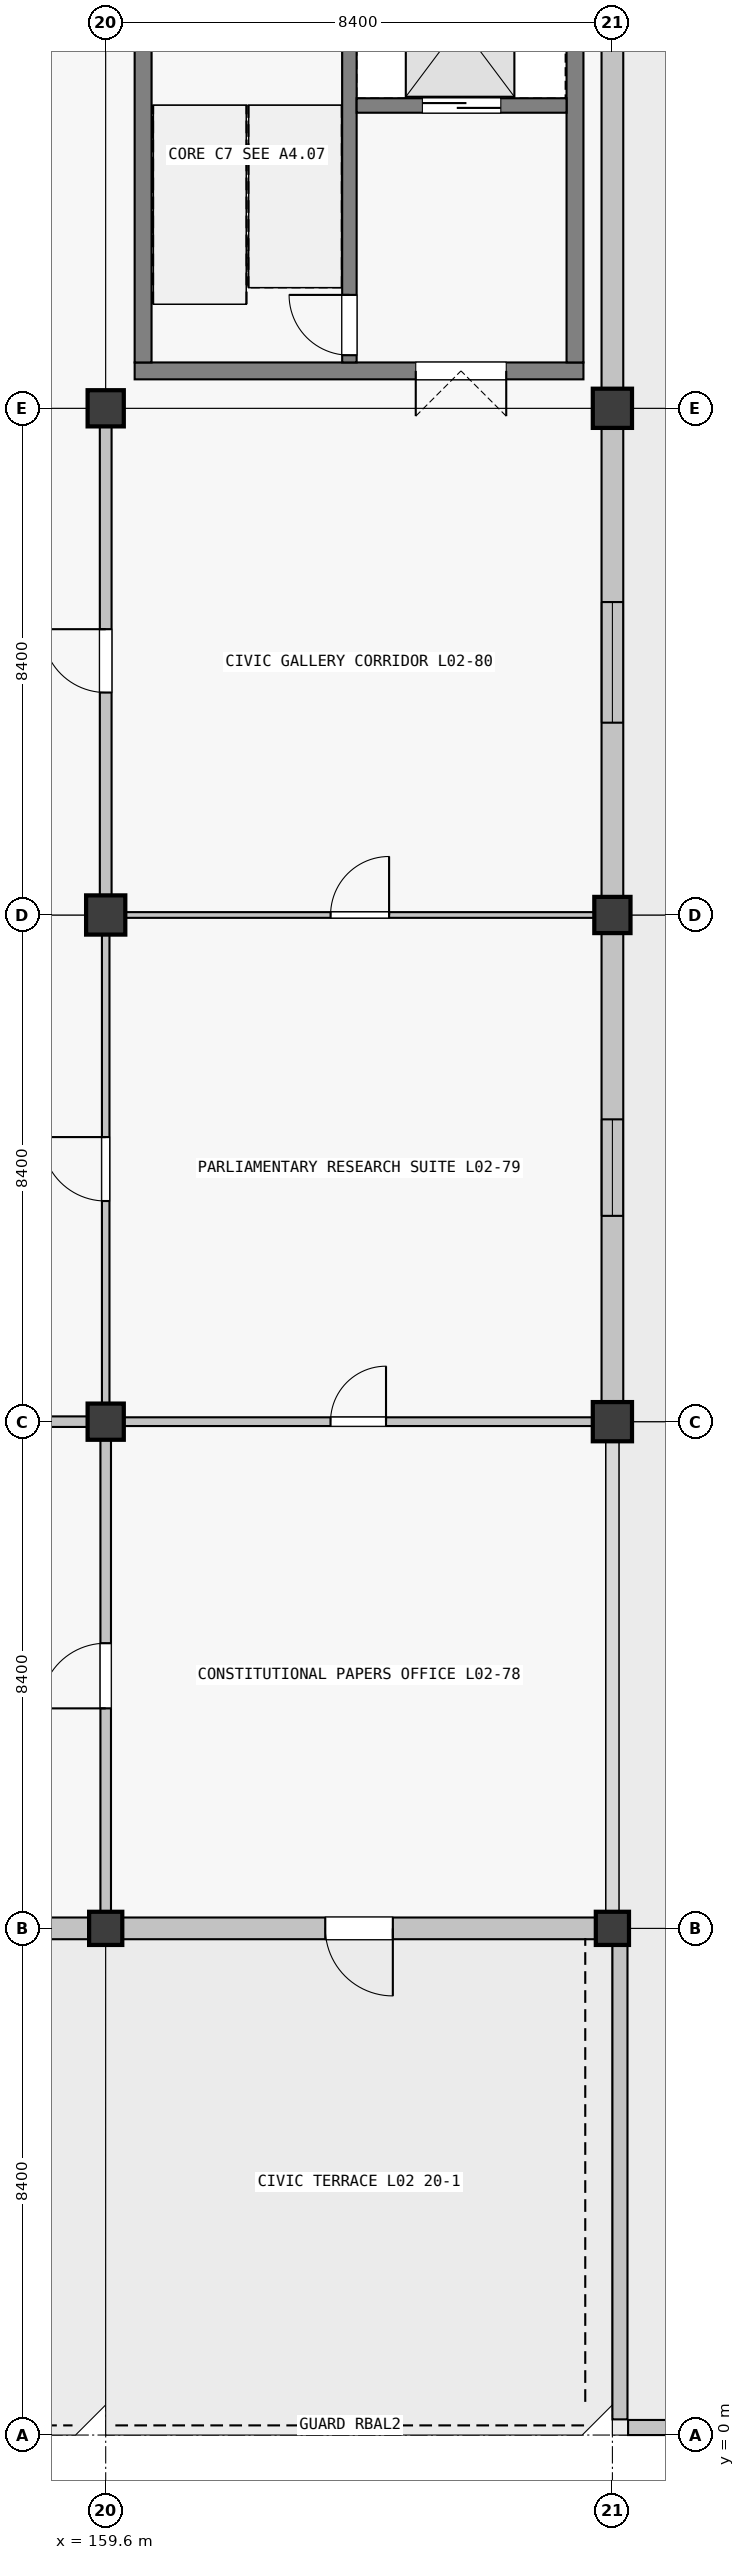
"""IFC4 building model, lengths in metres.
Left out: names, types, materials, properties, quantities, classifications, styles, units other than length and angle.
Written with IfcOpenShell. Run it as: python <this file> out.ifc"""

import sys

from ifc_helpers import new_model, si_unit, direction, frame, frame_2d, origin, origin_2d, place, context, subcontext, project, spatial, rectangle, extrude, element, fill, save


model = new_model("IFC4")
c1 = context("Model", 3, precision=1e-05, world=origin(), true_north=direction((0.0, 1.0)))
c2 = subcontext(c1, "Body", "Model", "MODEL_VIEW")
j1 = project(units=[si_unit("LENGTHUNIT", "METRE"), si_unit("PLANEANGLEUNIT", "RADIAN")], contexts=[c1])
p1 = place(None, origin())
s1 = spatial("IfcSite", under=j1, at=p1, CompositionType="ELEMENT")
p2 = place(p1, origin())
s2 = spatial("IfcBuilding", under=s1, at=p2, CompositionType="ELEMENT")
p3 = place(p2, frame((0.0, 0.0, 10.26)))
s3 = spatial("IfcBuildingStorey", under=s2, at=p3, CompositionType="ELEMENT", Elevation=10.26)
p4 = place(p3, frame((159.6, 8.4, 0.0), z_axis=(0.0, 0.0, 1.0), x_axis=(1.0, 0.0, 0.0)))
e1 = element("IfcColumn", 1, at=p4, inside=s3, PredefinedType="COLUMN", context=c2, shape_type="SweptSolid", body=[
    extrude(rectangle(XDim=0.55, YDim=0.55, at=origin_2d()), origin(), (0.0, 0.0, 1.0), 4.25),
])
p5 = place(p3, frame((159.6, 16.8, 0.0), z_axis=(0.0, 0.0, 1.0), x_axis=(1.0, 0.0, 0.0)))
e2 = element("IfcColumn", 2, at=p5, inside=s3, PredefinedType="COLUMN", context=c2, shape_type="SweptSolid", body=[
    extrude(rectangle(XDim=0.6, YDim=0.6, at=origin_2d()), origin(), (0.0, 0.0, 1.0), 4.5),
])
p6 = place(p3, frame((159.6, 25.2, 0.0), z_axis=(0.0, 0.0, 1.0), x_axis=(1.0, 0.0, 0.0)))
e3 = element("IfcColumn", 3, at=p6, inside=s3, PredefinedType="COLUMN", context=c2, shape_type="SweptSolid", body=[
    extrude(rectangle(XDim=0.65, YDim=0.65, at=origin_2d()), origin(), (0.0, 0.0, 1.0), 4.5),
])
p7 = place(p3, frame((159.6, 33.6, 0.0), z_axis=(0.0, 0.0, 1.0), x_axis=(1.0, 0.0, 0.0)))
e4 = element("IfcColumn", 4, at=p7, inside=s3, PredefinedType="COLUMN", context=c2, shape_type="SweptSolid", body=[
    extrude(rectangle(XDim=0.6, YDim=0.6, at=origin_2d()), origin(), (0.0, 0.0, 1.0), 4.5),
])
p8 = place(p3, frame((168.0, 8.4, 0.0), z_axis=(0.0, 0.0, 1.0), x_axis=(1.0, 0.0, 0.0)))
e5 = element("IfcColumn", 5, at=p8, inside=s3, PredefinedType="COLUMN", context=c2, shape_type="SweptSolid", body=[
    extrude(rectangle(XDim=0.55, YDim=0.55, at=origin_2d()), origin(), (0.0, 0.0, 1.0), 4.25),
])
p9 = place(p3, frame((168.0, 16.8, 0.0), z_axis=(0.0, 0.0, 1.0), x_axis=(1.0, 0.0, 0.0)))
e6 = element("IfcColumn", 6, at=p9, inside=s3, PredefinedType="COLUMN", context=c2, shape_type="SweptSolid", body=[
    extrude(rectangle(XDim=0.65, YDim=0.65, at=origin_2d()), origin(), (0.0, 0.0, 1.0), 4.5),
])
p10 = place(p3, frame((168.0, 25.2, 0.0), z_axis=(0.0, 0.0, 1.0), x_axis=(1.0, 0.0, 0.0)))
e7 = element("IfcColumn", 7, at=p10, inside=s3, PredefinedType="COLUMN", context=c2, shape_type="SweptSolid", body=[
    extrude(rectangle(XDim=0.6, YDim=0.6, at=origin_2d()), origin(), (0.0, 0.0, 1.0), 4.5),
])
p11 = place(p3, frame((168.0, 33.6, 0.0), z_axis=(0.0, 0.0, 1.0), x_axis=(1.0, 0.0, 0.0)))
e8 = element("IfcColumn", 8, at=p11, inside=s3, PredefinedType="COLUMN", context=c2, shape_type="SweptSolid", body=[
    extrude(rectangle(XDim=0.65, YDim=0.65, at=origin_2d()), origin(), (0.0, 0.0, 1.0), 4.5),
])
p12 = place(p3, frame((159.324, 8.4, 0.0), z_axis=(0.0, 0.0, 1.0), x_axis=(-1.0, 0.0, 0.0)))
e9 = element("IfcWall", 9, at=p12, inside=s3, PredefinedType="SOLIDWALL", context=c2, shape_type="SweptSolid", body=[
    extrude(rectangle(XDim=7.848, YDim=0.36, at=frame_2d((3.924, 0.0))), origin(), (0.0, 0.0, 1.0), 3.54),
])
p13 = place(p12, frame((2.999, 0.0, 0.0)))
e10 = element("IfcOpeningElement", 10, at=p13, cuts=e9, PredefinedType="OPENING", context=c2, shape_type="SweptSolid", body=[
    extrude(rectangle(XDim=1.85, YDim=2.2, at=frame_2d((0.925, 1.1))), frame((0.0, 0.18, 0.0), z_axis=(0.0, -1.0, 0.0), x_axis=(1.0, 0.0, 0.0)), (0.0, 0.0, 1.0), 0.36),
])
p14 = place(p3, frame((167.724, 8.4, 0.0), z_axis=(0.0, 0.0, 1.0), x_axis=(-1.0, 0.0, 0.0)))
e11 = element("IfcWall", 11, at=p14, inside=s3, PredefinedType="SOLIDWALL", context=c2, shape_type="SweptSolid", body=[
    extrude(rectangle(XDim=7.848, YDim=0.36, at=frame_2d((3.924, 0.0))), origin(), (0.0, 0.0, 1.0), 3.54),
])
p15 = place(p14, frame((3.364, 0.0, 0.0)))
e12 = element("IfcOpeningElement", 12, at=p15, cuts=e11, PredefinedType="OPENING", context=c2, shape_type="SweptSolid", body=[
    extrude(rectangle(XDim=1.12, YDim=2.2, at=frame_2d((0.56, 1.1))), frame((0.0, 0.18, 0.0), z_axis=(0.0, -1.0, 0.0), x_axis=(1.0, 0.0, 0.0)), (0.0, 0.0, 1.0), 0.36),
])
p16 = place(p3, frame((168.0, 24.899, 0.0), z_axis=(0.0, 0.0, 1.0), x_axis=(0.0, -1.0, 0.0)))
e13 = element("IfcWall", 13, at=p16, inside=s3, PredefinedType="SOLIDWALL", context=c2, shape_type="SweptSolid", body=[
    extrude(rectangle(XDim=7.773, YDim=0.36, at=frame_2d((3.886, 0.0))), origin(), (0.0, 0.0, 1.0), 3.54),
])
p17 = place(p16, frame((3.087, 0.0, 0.9)))
e14 = element("IfcOpeningElement", 14, at=p17, cuts=e13, PredefinedType="OPENING", context=c2, shape_type="SweptSolid", body=[
    extrude(rectangle(XDim=1.6, YDim=2.1, at=frame_2d((0.8, 1.05))), frame((0.0, 0.18, 0.0), z_axis=(0.0, -1.0, 0.0), x_axis=(1.0, 0.0, 0.0)), (0.0, 0.0, 1.0), 0.36),
])
p18 = place(p3, frame((168.0, 33.274, 0.0), z_axis=(0.0, 0.0, 1.0), x_axis=(0.0, -1.0, 0.0)))
e15 = element("IfcWall", 15, at=p18, inside=s3, PredefinedType="SOLIDWALL", context=c2, shape_type="SweptSolid", body=[
    extrude(rectangle(XDim=7.773, YDim=0.36, at=frame_2d((3.886, 0.0))), origin(), (0.0, 0.0, 1.0), 3.54),
])
p19 = place(p18, frame((2.886, 0.0, 0.9)))
e16 = element("IfcOpeningElement", 16, at=p19, cuts=e15, PredefinedType="OPENING", context=c2, shape_type="SweptSolid", body=[
    extrude(rectangle(XDim=2.0, YDim=2.1, at=frame_2d((1.0, 1.05))), frame((0.0, 0.18, 0.0), z_axis=(0.0, -1.0, 0.0), x_axis=(1.0, 0.0, 0.0)), (0.0, 0.0, 1.0), 0.36),
])
p20 = place(p3, frame((168.0, 41.699, 0.0), z_axis=(0.0, 0.0, 1.0), x_axis=(0.0, -1.0, 0.0)))
e17 = element("IfcWall", 17, at=p20, inside=s3, PredefinedType="SOLIDWALL", context=c2, shape_type="SweptSolid", body=[
    extrude(rectangle(XDim=7.773, YDim=0.36, at=frame_2d((3.886, 0.0))), origin(), (0.0, 0.0, 1.0), 3.54),
])
for number, where, z_axis, x_axis in (
    (18, (176.14, 0.125, 0.0), (0.0, 0.0, 1.0), (-1.0, 0.0, 0.0)),
    (19, (168.125, 0.26, 0.0), (0.0, 0.0, 1.0), (0.0, 1.0, 0.0)),
):
    element("IfcWall", number, at=place(p3, frame(where, z_axis=z_axis, x_axis=x_axis)), inside=s3, PredefinedType="PARAPET", context=c2, shape_type="SweptSolid", body=[
        extrude(rectangle(XDim=7.88, YDim=0.25, at=frame_2d((3.94, 0.0))), origin(), (0.0, 0.0, 1.0), 0.95),
    ])
p21 = place(p3, frame((167.52, 34.22, 0.0), z_axis=(0.0, 0.0, 1.0), x_axis=(-1.0, 0.0, 0.0)))
e20 = element("IfcWall", 20, at=p21, inside=s3, PredefinedType="SHEAR", context=c2, shape_type="SweptSolid", body=[
    extrude(rectangle(XDim=7.44, YDim=0.28, at=frame_2d((3.72, 0.0))), origin(), (0.0, 0.0, 1.0), 4.5),
])
p22 = place(p21, frame((1.28, 0.0, 0.0)))
e21 = element("IfcOpeningElement", 21, at=p22, cuts=e20, PredefinedType="OPENING", context=c2, shape_type="SweptSolid", body=[
    extrude(rectangle(XDim=1.5, YDim=2.15, at=frame_2d((0.75, 1.075))), frame((0.0, 0.14, 0.0), z_axis=(0.0, -1.0, 0.0), x_axis=(1.0, 0.0, 0.0)), (0.0, 0.0, 1.0), 0.28),
])
for number, where, z_axis, x_axis in (
    (22, (160.22, 34.36, 0.0), (0.0, 0.0, 1.0), (0.0, 1.0, 0.0)),
    (23, (167.38, 41.24, 0.0), (0.0, 0.0, 1.0), (0.0, -1.0, 0.0)),
):
    element("IfcWall", number, at=place(p3, frame(where, z_axis=z_axis, x_axis=x_axis)), inside=s3, PredefinedType="SHEAR", context=c2, shape_type="SweptSolid", body=[
        extrude(rectangle(XDim=6.88, YDim=0.28, at=frame_2d((3.44, 0.0))), origin(), (0.0, 0.0, 1.0), 4.5),
    ])
p23 = place(p3, frame((163.64, 34.36, 0.0), z_axis=(0.0, 0.0, 1.0), x_axis=(0.0, 1.0, 0.0)))
e24 = element("IfcWall", 24, at=p23, inside=s3, PredefinedType="SHEAR", context=c2, shape_type="SweptSolid", body=[
    extrude(rectangle(XDim=6.88, YDim=0.24, at=frame_2d((3.44, 0.0))), origin(), (0.0, 0.0, 1.0), 4.5),
])
p24 = place(p23, frame((0.12, 0.0, 0.0)))
e25 = element("IfcOpeningElement", 25, at=p24, cuts=e24, PredefinedType="OPENING", context=c2, shape_type="SweptSolid", body=[
    extrude(rectangle(XDim=1.0, YDim=2.15, at=frame_2d((0.5, 1.075))), frame((0.0, 0.12, 0.0), z_axis=(0.0, -1.0, 0.0), x_axis=(1.0, 0.0, 0.0)), (0.0, 0.0, 1.0), 0.24),
])
p25 = place(p3, frame((163.76, 38.62, 0.0), z_axis=(0.0, 0.0, 1.0), x_axis=(1.0, 0.0, 0.0)))
e26 = element("IfcWall", 26, at=p25, inside=s3, PredefinedType="SHEAR", context=c2, shape_type="SweptSolid", body=[
    extrude(rectangle(XDim=3.48, YDim=0.24, at=frame_2d((1.74, 0.0))), origin(), (0.0, 0.0, 1.0), 4.5),
])
p26 = place(p25, frame((1.09, 0.0, 0.0)))
e27 = element("IfcOpeningElement", 27, at=p26, cuts=e26, PredefinedType="OPENING", context=c2, shape_type="SweptSolid", body=[
    extrude(rectangle(XDim=1.3, YDim=2.25, at=frame_2d((0.65, 1.125))), frame((0.0, 0.12, 0.0), z_axis=(0.0, -1.0, 0.0), x_axis=(1.0, 0.0, 0.0)), (0.0, 0.0, 1.0), 0.24),
])
p27 = place(p3, frame((151.527, 16.8, 0.0), z_axis=(0.0, 0.0, 1.0), x_axis=(1.0, 0.0, 0.0)))
e28 = element("IfcWall", 28, at=p27, inside=s3, PredefinedType="PARTITIONING", context=c2, shape_type="SweptSolid", body=[
    extrude(rectangle(XDim=7.771, YDim=0.175, at=frame_2d((3.885, 0.0))), origin(), (0.0, 0.0, 1.0), 3.37),
])
p28 = place(p27, frame((3.396, 0.0, 0.0)))
e29 = element("IfcOpeningElement", 29, at=p28, cuts=e28, PredefinedType="OPENING", context=c2, shape_type="SweptSolid", body=[
    extrude(rectangle(XDim=0.98, YDim=2.18, at=frame_2d((0.49, 1.09))), frame((0.0, 0.087, 0.0), z_axis=(0.0, -1.0, 0.0), x_axis=(1.0, 0.0, 0.0)), (0.0, 0.0, 1.0), 0.175),
])
p29 = place(p3, frame((159.902, 16.8, 0.0), z_axis=(0.0, 0.0, 1.0), x_axis=(1.0, 0.0, 0.0)))
e30 = element("IfcWall", 30, at=p29, inside=s3, PredefinedType="PARTITIONING", context=c2, shape_type="SweptSolid", body=[
    extrude(rectangle(XDim=7.771, YDim=0.145, at=frame_2d((3.885, 0.0))), origin(), (0.0, 0.0, 1.0), 3.37),
])
p30 = place(p29, frame((3.425, 0.0, 0.0)))
e31 = element("IfcOpeningElement", 31, at=p30, cuts=e30, PredefinedType="OPENING", context=c2, shape_type="SweptSolid", body=[
    extrude(rectangle(XDim=0.92, YDim=2.15, at=frame_2d((0.46, 1.075))), frame((0.0, 0.073, 0.0), z_axis=(0.0, -1.0, 0.0), x_axis=(1.0, 0.0, 0.0)), (0.0, 0.0, 1.0), 0.145),
])
p31 = place(p3, frame((159.927, 25.2, 0.0), z_axis=(0.0, 0.0, 1.0), x_axis=(1.0, 0.0, 0.0)))
e32 = element("IfcWall", 32, at=p31, inside=s3, PredefinedType="PARTITIONING", context=c2, shape_type="SweptSolid", body=[
    extrude(rectangle(XDim=7.771, YDim=0.095, at=frame_2d((3.885, 0.0))), origin(), (0.0, 0.0, 1.0), 3.37),
])
p32 = place(p31, frame((3.401, 0.0, 0.0)))
e33 = element("IfcOpeningElement", 33, at=p32, cuts=e32, PredefinedType="OPENING", context=c2, shape_type="SweptSolid", body=[
    extrude(rectangle(XDim=0.97, YDim=2.12, at=frame_2d((0.485, 1.06))), frame((0.0, 0.047, 0.0), z_axis=(0.0, -1.0, 0.0), x_axis=(1.0, 0.0, 0.0)), (0.0, 0.0, 1.0), 0.095),
])
p33 = place(p3, frame((159.6, 8.677, 0.0), z_axis=(0.0, 0.0, 1.0), x_axis=(0.0, 1.0, 0.0)))
e34 = element("IfcWall", 34, at=p33, inside=s3, PredefinedType="PARTITIONING", context=c2, shape_type="SweptSolid", body=[
    extrude(rectangle(XDim=7.821, YDim=0.175, at=frame_2d((3.911, 0.0))), origin(), (0.0, 0.0, 1.0), 3.37),
])
p34 = place(p33, frame((3.37, 0.0, 0.0)))
e35 = element("IfcOpeningElement", 35, at=p34, cuts=e34, PredefinedType="OPENING", context=c2, shape_type="SweptSolid", body=[
    extrude(rectangle(XDim=1.08, YDim=2.25, at=frame_2d((0.54, 1.125))), frame((0.0, 0.087, 0.0), z_axis=(0.0, -1.0, 0.0), x_axis=(1.0, 0.0, 0.0)), (0.0, 0.0, 1.0), 0.175),
])
p35 = place(p3, frame((159.6, 17.102, 0.0), z_axis=(0.0, 0.0, 1.0), x_axis=(0.0, 1.0, 0.0)))
e36 = element("IfcWall", 36, at=p35, inside=s3, PredefinedType="PARTITIONING", context=c2, shape_type="SweptSolid", body=[
    extrude(rectangle(XDim=7.771, YDim=0.125, at=frame_2d((3.885, 0.0))), origin(), (0.0, 0.0, 1.0), 3.37),
])
p36 = place(p35, frame((3.356, 0.0, 0.0)))
e37 = element("IfcOpeningElement", 37, at=p36, cuts=e36, PredefinedType="OPENING", context=c2, shape_type="SweptSolid", body=[
    extrude(rectangle(XDim=1.06, YDim=2.25, at=frame_2d((0.53, 1.125))), frame((0.0, 0.062, 0.0), z_axis=(0.0, -1.0, 0.0), x_axis=(1.0, 0.0, 0.0)), (0.0, 0.0, 1.0), 0.125),
])
p37 = place(p3, frame((159.6, 25.527, 0.0), z_axis=(0.0, 0.0, 1.0), x_axis=(0.0, 1.0, 0.0)))
e38 = element("IfcWall", 38, at=p37, inside=s3, PredefinedType="PARTITIONING", context=c2, shape_type="SweptSolid", body=[
    extrude(rectangle(XDim=7.771, YDim=0.195, at=frame_2d((3.885, 0.0))), origin(), (0.0, 0.0, 1.0), 3.37),
])
p38 = place(p37, frame((3.361, 0.0, 0.0)))
e39 = element("IfcOpeningElement", 39, at=p38, cuts=e38, PredefinedType="OPENING", context=c2, shape_type="SweptSolid", body=[
    extrude(rectangle(XDim=1.05, YDim=2.12, at=frame_2d((0.525, 1.06))), frame((0.0, 0.098, 0.0), z_axis=(0.0, -1.0, 0.0), x_axis=(1.0, 0.0, 0.0)), (0.0, 0.0, 1.0), 0.195),
])
p39 = place(p15, origin())
e40 = element("IfcDoor", 40, at=p39, inside=s3, OperationType="SINGLE_SWING_LEFT", PredefinedType="DOOR", context=c2, shape_type="SweptSolid", body=[
    extrude(rectangle(XDim=1.12, YDim=2.2, at=frame_2d((0.56, 1.1))), frame((0.0, 0.025, 0.0), z_axis=(0.0, -1.0, 0.0), x_axis=(1.0, 0.0, 0.0)), (0.0, 0.0, 1.0), 0.05),
])
fill(e12, e40)
p40 = place(p17, origin())
e41 = element("IfcWindow", 41, at=p40, inside=s3, PartitioningType="SINGLE_PANEL", PredefinedType="WINDOW", context=c2, shape_type="SweptSolid", body=[
    extrude(rectangle(XDim=1.6, YDim=2.1, at=frame_2d((0.8, 1.05))), frame((0.0, 0.03, 0.0), z_axis=(0.0, -1.0, 0.0), x_axis=(1.0, 0.0, 0.0)), (0.0, 0.0, 1.0), 0.06),
])
fill(e14, e41)
p41 = place(p19, origin())
e42 = element("IfcWindow", 42, at=p41, inside=s3, PartitioningType="SINGLE_PANEL", PredefinedType="WINDOW", context=c2, shape_type="SweptSolid", body=[
    extrude(rectangle(XDim=2.0, YDim=2.1, at=frame_2d((1.0, 1.05))), frame((0.0, 0.03, 0.0), z_axis=(0.0, -1.0, 0.0), x_axis=(1.0, 0.0, 0.0)), (0.0, 0.0, 1.0), 0.06),
])
fill(e16, e42)
p42 = place(p24, origin())
e43 = element("IfcDoor", 43, at=p42, inside=s3, OperationType="SINGLE_SWING_RIGHT", PredefinedType="DOOR", context=c2, shape_type="SweptSolid", body=[
    extrude(rectangle(XDim=1.0, YDim=2.15, at=frame_2d((0.5, 1.075))), frame((0.0, 0.025, 0.0), z_axis=(0.0, -1.0, 0.0), x_axis=(1.0, 0.0, 0.0)), (0.0, 0.0, 1.0), 0.05),
])
fill(e25, e43)
p43 = place(p22, origin())
e44 = element("IfcDoor", 44, at=p43, inside=s3, OperationType="DOUBLE_DOOR_SINGLE_SWING", PredefinedType="DOOR", context=c2, shape_type="SweptSolid", body=[
    extrude(rectangle(XDim=1.5, YDim=2.15, at=frame_2d((0.75, 1.075))), frame((0.0, 0.025, 0.0), z_axis=(0.0, -1.0, 0.0), x_axis=(1.0, 0.0, 0.0)), (0.0, 0.0, 1.0), 0.05),
])
fill(e21, e44)
p44 = place(p26, origin())
e45 = element("IfcDoor", 45, at=p44, inside=s3, OperationType="DOUBLE_DOOR_SLIDING", PredefinedType="DOOR", context=c2, shape_type="SweptSolid", body=[
    extrude(rectangle(XDim=1.3, YDim=2.25, at=frame_2d((0.65, 1.125))), frame((0.0, 0.025, 0.0), z_axis=(0.0, -1.0, 0.0), x_axis=(1.0, 0.0, 0.0)), (0.0, 0.0, 1.0), 0.05),
])
fill(e27, e45)
p45 = place(p32, origin())
e46 = element("IfcDoor", 46, at=p45, inside=s3, OperationType="SINGLE_SWING_RIGHT", PredefinedType="DOOR", context=c2, shape_type="SweptSolid", body=[
    extrude(rectangle(XDim=0.97, YDim=2.12, at=frame_2d((0.485, 1.06))), frame((0.0, 0.025, 0.0), z_axis=(0.0, -1.0, 0.0), x_axis=(1.0, 0.0, 0.0)), (0.0, 0.0, 1.0), 0.05),
])
fill(e33, e46)
p46 = place(p38, origin())
e47 = element("IfcDoor", 47, at=p46, inside=s3, OperationType="SINGLE_SWING_RIGHT", PredefinedType="DOOR", context=c2, shape_type="SweptSolid", body=[
    extrude(rectangle(XDim=1.05, YDim=2.12, at=frame_2d((0.525, 1.06))), frame((0.0, 0.025, 0.0), z_axis=(0.0, -1.0, 0.0), x_axis=(1.0, 0.0, 0.0)), (0.0, 0.0, 1.0), 0.05),
])
fill(e39, e47)
p47 = place(p30, origin())
e48 = element("IfcDoor", 48, at=p47, inside=s3, OperationType="SINGLE_SWING_RIGHT", PredefinedType="DOOR", context=c2, shape_type="SweptSolid", body=[
    extrude(rectangle(XDim=0.92, YDim=2.15, at=frame_2d((0.46, 1.075))), frame((0.0, 0.025, 0.0), z_axis=(0.0, -1.0, 0.0), x_axis=(1.0, 0.0, 0.0)), (0.0, 0.0, 1.0), 0.05),
])
fill(e31, e48)
p48 = place(p36, origin())
e49 = element("IfcDoor", 49, at=p48, inside=s3, OperationType="SINGLE_SWING_RIGHT", PredefinedType="DOOR", context=c2, shape_type="SweptSolid", body=[
    extrude(rectangle(XDim=1.06, YDim=2.25, at=frame_2d((0.53, 1.125))), frame((0.0, 0.025, 0.0), z_axis=(0.0, -1.0, 0.0), x_axis=(1.0, 0.0, 0.0)), (0.0, 0.0, 1.0), 0.05),
])
fill(e37, e49)
p49 = place(p34, origin())
e50 = element("IfcDoor", 50, at=p49, inside=s3, OperationType="SINGLE_SWING_LEFT", PredefinedType="DOOR", context=c2, shape_type="SweptSolid", body=[
    extrude(rectangle(XDim=1.08, YDim=2.25, at=frame_2d((0.54, 1.125))), frame((0.0, 0.025, 0.0), z_axis=(0.0, -1.0, 0.0), x_axis=(1.0, 0.0, 0.0)), (0.0, 0.0, 1.0), 0.05),
])
fill(e35, e50)
save(model, sys.argv[1])
